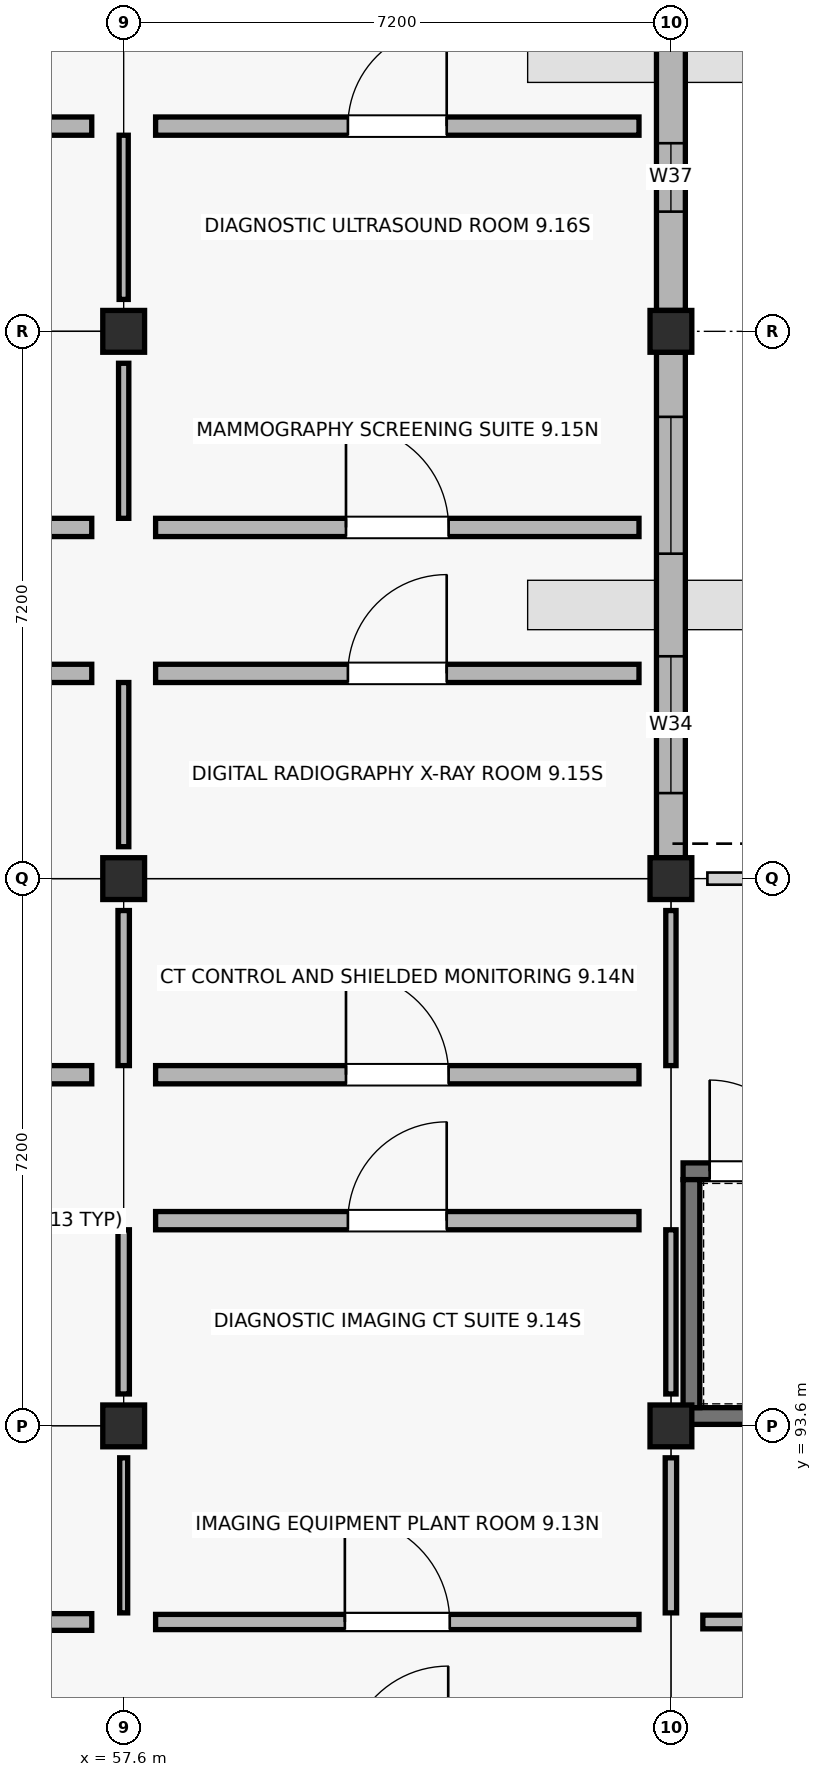
"""IFC4 building model, lengths in metres.
Left out: names, types, materials, properties, quantities, classifications, styles, units other than length and angle.
Written with IfcOpenShell. Run it as: python <this file> out.ifc"""

import sys

from ifc_helpers import new_model, si_unit, direction, frame, frame_2d, origin, origin_2d, place, context, subcontext, project, spatial, rectangle, extrude, element, fill, save


model = new_model("IFC4")
c1 = context("Model", 3, precision=1e-05, world=origin(), true_north=direction((0.0, 1.0)))
c2 = subcontext(c1, "Body", "Model", "MODEL_VIEW")
j1 = project(units=[si_unit("LENGTHUNIT", "METRE"), si_unit("PLANEANGLEUNIT", "RADIAN")], contexts=[c1])
p1 = place(None, origin())
s1 = spatial("IfcSite", under=j1, at=p1, CompositionType="ELEMENT")
p2 = place(p1, origin())
s2 = spatial("IfcBuilding", under=s1, at=p2, CompositionType="ELEMENT")
p3 = place(p2, frame((0.0, 0.0, 4.5)))
s3 = spatial("IfcBuildingStorey", under=s2, at=p3, CompositionType="ELEMENT", Elevation=4.5)
for number, where, z_axis, x_axis in (
    (1, (57.6, 93.6, 0.0), (0.0, 0.0, 1.0), (1.0, 0.0, 0.0)),
    (2, (57.6, 100.8, 0.0), (0.0, 0.0, 1.0), (1.0, 0.0, 0.0)),
    (3, (57.6, 108.0, 0.0), (0.0, 0.0, 1.0), (1.0, 0.0, 0.0)),
    (4, (64.8, 93.6, 0.0), (0.0, 0.0, 1.0), (1.0, 0.0, 0.0)),
    (5, (64.8, 100.8, 0.0), (0.0, 0.0, 1.0), (1.0, 0.0, 0.0)),
    (6, (64.8, 108.0, 0.0), (0.0, 0.0, 1.0), (1.0, 0.0, 0.0)),
):
    element("IfcColumn", number, at=place(p3, frame(where, z_axis=z_axis, x_axis=x_axis)), inside=s3, PredefinedType="COLUMN", context=c2, shape_type="SweptSolid", body=[
        extrude(rectangle(XDim=0.55, YDim=0.55, at=origin_2d()), origin(), (0.0, 0.0, 1.0), 4.5),
    ])
p4 = place(p3, frame((64.8, 101.075, 0.0), z_axis=(0.0, 0.0, 1.0), x_axis=(0.0, 1.0, 0.0)))
e7 = element("IfcWall", 7, at=p4, inside=s3, PredefinedType="SOLIDWALL", context=c2, shape_type="SweptSolid", body=[
    extrude(rectangle(XDim=6.65, YDim=0.38, at=frame_2d((3.325, 0.0))), origin(), (0.0, 0.0, 1.0), 3.52),
])
p5 = place(p4, frame((0.85, 0.0, 0.9)))
e8 = element("IfcOpeningElement", 8, at=p5, cuts=e7, PredefinedType="OPENING", context=c2, shape_type="SweptSolid", body=[
    extrude(rectangle(XDim=1.8, YDim=1.62, at=frame_2d((0.9, 0.81))), frame((0.0, 0.2, 0.0), z_axis=(0.0, -1.0, 0.0), x_axis=(1.0, 0.0, 0.0)), (0.0, 0.0, 1.0), 0.4),
])
p6 = place(p4, frame((4.0, 0.0, 0.9)))
e9 = element("IfcOpeningElement", 9, at=p6, cuts=e7, PredefinedType="OPENING", context=c2, shape_type="SweptSolid", body=[
    extrude(rectangle(XDim=1.8, YDim=1.62, at=frame_2d((0.9, 0.81))), frame((0.0, 0.2, 0.0), z_axis=(0.0, -1.0, 0.0), x_axis=(1.0, 0.0, 0.0)), (0.0, 0.0, 1.0), 0.4),
])
p7 = place(p3, frame((64.8, 108.275, 0.0), z_axis=(0.0, 0.0, 1.0), x_axis=(0.0, 1.0, 0.0)))
e10 = element("IfcWall", 10, at=p7, inside=s3, PredefinedType="SOLIDWALL", context=c2, shape_type="SweptSolid", body=[
    extrude(rectangle(XDim=6.65, YDim=0.38, at=frame_2d((3.325, 0.0))), origin(), (0.0, 0.0, 1.0), 3.52),
])
p8 = place(p7, frame((1.3, 0.0, 0.9)))
e11 = element("IfcOpeningElement", 11, at=p8, cuts=e10, PredefinedType="OPENING", context=c2, shape_type="SweptSolid", body=[
    extrude(rectangle(XDim=0.9, YDim=1.75, at=frame_2d((0.45, 0.875))), frame((0.0, 0.2, 0.0), z_axis=(0.0, -1.0, 0.0), x_axis=(1.0, 0.0, 0.0)), (0.0, 0.0, 1.0), 0.4),
])
p9 = place(p7, frame((4.45, 0.0, 0.9)))
e12 = element("IfcOpeningElement", 12, at=p9, cuts=e10, PredefinedType="OPENING", context=c2, shape_type="SweptSolid", body=[
    extrude(rectangle(XDim=0.9, YDim=1.75, at=frame_2d((0.45, 0.875))), frame((0.0, 0.2, 0.0), z_axis=(0.0, -1.0, 0.0), x_axis=(1.0, 0.0, 0.0)), (0.0, 0.0, 1.0), 0.4),
])
p10 = place(p3, frame((64.96, 93.73, 0.0), z_axis=(0.0, 0.0, 1.0), x_axis=(1.0, 0.0, 0.0)))
e13 = element("IfcWall", 13, at=p10, inside=s3, PredefinedType="SHEAR", context=c2, shape_type="SweptSolid", body=[
    extrude(rectangle(XDim=6.88, YDim=0.22, at=frame_2d((3.44, 0.0))), origin(), (0.0, 0.0, 1.0), 4.22),
])
p11 = place(p3, frame((64.96, 96.95, 0.0), z_axis=(0.0, 0.0, 1.0), x_axis=(1.0, 0.0, 0.0)))
e14 = element("IfcWall", 14, at=p11, inside=s3, PredefinedType="SHEAR", context=c2, shape_type="SweptSolid", body=[
    extrude(rectangle(XDim=6.88, YDim=0.22, at=frame_2d((3.44, 0.0))), origin(), (0.0, 0.0, 1.0), 4.22),
])
p12 = place(p11, frame((0.35, 0.0, 0.0)))
e15 = element("IfcOpeningElement", 15, at=p12, cuts=e14, PredefinedType="OPENING", context=c2, shape_type="SweptSolid", body=[
    extrude(rectangle(XDim=1.2, YDim=2.15, at=frame_2d((0.6, 1.075))), frame((0.0, 0.12, 0.0), z_axis=(0.0, -1.0, 0.0), x_axis=(1.0, 0.0, 0.0)), (0.0, 0.0, 1.0), 0.24),
])
p13 = place(p3, frame((65.07, 93.84, 0.0), z_axis=(0.0, 0.0, 1.0), x_axis=(0.0, 1.0, 0.0)))
e16 = element("IfcWall", 16, at=p13, inside=s3, PredefinedType="SHEAR", context=c2, shape_type="SweptSolid", body=[
    extrude(rectangle(XDim=3.0, YDim=0.22, at=frame_2d((1.5, 0.0))), origin(), (0.0, 0.0, 1.0), 4.22),
])
p14 = place(p3, frame((65.22, 91.02, 0.0), z_axis=(0.0, 0.0, 1.0), x_axis=(1.0, 0.0, 0.0)))
e17 = element("IfcWall", 17, at=p14, inside=s3, PredefinedType="PARTITIONING", context=c2, shape_type="SweptSolid", body=[
    extrude(rectangle(XDim=6.36, YDim=0.18, at=frame_2d((3.18, 0.0))), origin(), (0.0, 0.0, 1.0), 3.36),
])
p15 = place(p14, frame((2.63, 0.0, 0.0)))
e18 = element("IfcOpeningElement", 18, at=p15, cuts=e17, PredefinedType="OPENING", context=c2, shape_type="SweptSolid", body=[
    extrude(rectangle(XDim=1.1, YDim=2.14, at=frame_2d((0.55, 1.07))), frame((0.0, 0.1, 0.0), z_axis=(0.0, -1.0, 0.0), x_axis=(1.0, 0.0, 0.0)), (0.0, 0.0, 1.0), 0.2),
])
p16 = place(p3, frame((50.82, 91.02, 0.0), z_axis=(0.0, 0.0, 1.0), x_axis=(1.0, 0.0, 0.0)))
e19 = element("IfcWall", 19, at=p16, inside=s3, PredefinedType="SOLIDWALL", context=c2, shape_type="SweptSolid", body=[
    extrude(rectangle(XDim=6.36, YDim=0.22, at=frame_2d((3.18, 0.0))), origin(), (0.0, 0.0, 1.0), 3.36),
])
p17 = place(p16, frame((2.65, 0.0, 0.0)))
e20 = element("IfcOpeningElement", 20, at=p17, cuts=e19, PredefinedType="OPENING", context=c2, shape_type="SweptSolid", body=[
    extrude(rectangle(XDim=1.06, YDim=2.04, at=frame_2d((0.53, 1.02))), frame((0.0, 0.12, 0.0), z_axis=(0.0, -1.0, 0.0), x_axis=(1.0, 0.0, 0.0)), (0.0, 0.0, 1.0), 0.24),
])
p18 = place(p3, frame((57.6, 91.14, 0.0), z_axis=(0.0, 0.0, 1.0), x_axis=(0.0, 1.0, 0.0)))
e21 = element("IfcWall", 21, at=p18, inside=s3, PredefinedType="PARTITIONING", context=c2, shape_type="SweptSolid", body=[
    extrude(rectangle(XDim=2.04, YDim=0.105, at=frame_2d((1.02, 0.0))), origin(), (0.0, 0.0, 1.0), 3.36),
])
p19 = place(p3, frame((50.82, 96.3, 0.0), z_axis=(0.0, 0.0, 1.0), x_axis=(1.0, 0.0, 0.0)))
e22 = element("IfcWall", 22, at=p19, inside=s3, PredefinedType="SOLIDWALL", context=c2, shape_type="SweptSolid", body=[
    extrude(rectangle(XDim=6.36, YDim=0.24, at=frame_2d((3.18, 0.0))), origin(), (0.0, 0.0, 1.0), 3.36),
])
p20 = place(p19, frame((2.53, 0.0, 0.0)))
e23 = element("IfcOpeningElement", 23, at=p20, cuts=e22, PredefinedType="OPENING", context=c2, shape_type="SweptSolid", body=[
    extrude(rectangle(XDim=1.3, YDim=2.15, at=frame_2d((0.65, 1.075))), frame((0.0, 0.13, 0.0), z_axis=(0.0, -1.0, 0.0), x_axis=(1.0, 0.0, 0.0)), (0.0, 0.0, 1.0), 0.26),
])
p21 = place(p3, frame((57.6, 94.02, 0.0), z_axis=(0.0, 0.0, 1.0), x_axis=(0.0, 1.0, 0.0)))
e24 = element("IfcWall", 24, at=p21, inside=s3, PredefinedType="PARTITIONING", context=c2, shape_type="SweptSolid", body=[
    extrude(rectangle(XDim=2.16, YDim=0.15, at=frame_2d((1.08, 0.0))), origin(), (0.0, 0.0, 1.0), 3.36),
])
p22 = place(p3, frame((50.82, 98.22, 0.0), z_axis=(0.0, 0.0, 1.0), x_axis=(1.0, 0.0, 0.0)))
e25 = element("IfcWall", 25, at=p22, inside=s3, PredefinedType="SOLIDWALL", context=c2, shape_type="SweptSolid", body=[
    extrude(rectangle(XDim=6.36, YDim=0.24, at=frame_2d((3.18, 0.0))), origin(), (0.0, 0.0, 1.0), 3.36),
])
p23 = place(p22, frame((2.505, 0.0, 0.0)))
e26 = element("IfcOpeningElement", 26, at=p23, cuts=e25, PredefinedType="OPENING", context=c2, shape_type="SweptSolid", body=[
    extrude(rectangle(XDim=1.35, YDim=2.2, at=frame_2d((0.675, 1.1))), frame((0.0, 0.13, 0.0), z_axis=(0.0, -1.0, 0.0), x_axis=(1.0, 0.0, 0.0)), (0.0, 0.0, 1.0), 0.26),
])
p24 = place(p3, frame((57.6, 98.34, 0.0), z_axis=(0.0, 0.0, 1.0), x_axis=(0.0, 1.0, 0.0)))
e27 = element("IfcWall", 27, at=p24, inside=s3, PredefinedType="PARTITIONING", context=c2, shape_type="SweptSolid", body=[
    extrude(rectangle(XDim=2.04, YDim=0.15, at=frame_2d((1.02, 0.0))), origin(), (0.0, 0.0, 1.0), 3.36),
])
p25 = place(p3, frame((50.82, 103.5, 0.0), z_axis=(0.0, 0.0, 1.0), x_axis=(1.0, 0.0, 0.0)))
e28 = element("IfcWall", 28, at=p25, inside=s3, PredefinedType="SOLIDWALL", context=c2, shape_type="SweptSolid", body=[
    extrude(rectangle(XDim=6.36, YDim=0.24, at=frame_2d((3.18, 0.0))), origin(), (0.0, 0.0, 1.0), 3.36),
])
p26 = place(p25, frame((2.53, 0.0, 0.0)))
e29 = element("IfcOpeningElement", 29, at=p26, cuts=e28, PredefinedType="OPENING", context=c2, shape_type="SweptSolid", body=[
    extrude(rectangle(XDim=1.3, YDim=2.15, at=frame_2d((0.65, 1.075))), frame((0.0, 0.13, 0.0), z_axis=(0.0, -1.0, 0.0), x_axis=(1.0, 0.0, 0.0)), (0.0, 0.0, 1.0), 0.26),
])
p27 = place(p3, frame((57.6, 101.22, 0.0), z_axis=(0.0, 0.0, 1.0), x_axis=(0.0, 1.0, 0.0)))
e30 = element("IfcWall", 30, at=p27, inside=s3, PredefinedType="PARTITIONING", context=c2, shape_type="SweptSolid", body=[
    extrude(rectangle(XDim=2.16, YDim=0.135, at=frame_2d((1.08, 0.0))), origin(), (0.0, 0.0, 1.0), 3.36),
])
p28 = place(p3, frame((50.82, 105.42, 0.0), z_axis=(0.0, 0.0, 1.0), x_axis=(1.0, 0.0, 0.0)))
e31 = element("IfcWall", 31, at=p28, inside=s3, PredefinedType="SOLIDWALL", context=c2, shape_type="SweptSolid", body=[
    extrude(rectangle(XDim=6.36, YDim=0.24, at=frame_2d((3.18, 0.0))), origin(), (0.0, 0.0, 1.0), 3.36),
])
p29 = place(p28, frame((2.505, 0.0, 0.0)))
e32 = element("IfcOpeningElement", 32, at=p29, cuts=e31, PredefinedType="OPENING", context=c2, shape_type="SweptSolid", body=[
    extrude(rectangle(XDim=1.35, YDim=2.2, at=frame_2d((0.675, 1.1))), frame((0.0, 0.13, 0.0), z_axis=(0.0, -1.0, 0.0), x_axis=(1.0, 0.0, 0.0)), (0.0, 0.0, 1.0), 0.26),
])
p30 = place(p3, frame((57.6, 105.54, 0.0), z_axis=(0.0, 0.0, 1.0), x_axis=(0.0, 1.0, 0.0)))
e33 = element("IfcWall", 33, at=p30, inside=s3, PredefinedType="PARTITIONING", context=c2, shape_type="SweptSolid", body=[
    extrude(rectangle(XDim=2.04, YDim=0.135, at=frame_2d((1.02, 0.0))), origin(), (0.0, 0.0, 1.0), 3.36),
])
p31 = place(p3, frame((50.82, 110.7, 0.0), z_axis=(0.0, 0.0, 1.0), x_axis=(1.0, 0.0, 0.0)))
e34 = element("IfcWall", 34, at=p31, inside=s3, PredefinedType="SOLIDWALL", context=c2, shape_type="SweptSolid", body=[
    extrude(rectangle(XDim=6.36, YDim=0.24, at=frame_2d((3.18, 0.0))), origin(), (0.0, 0.0, 1.0), 3.36),
])
p32 = place(p31, frame((2.53, 0.0, 0.0)))
e35 = element("IfcOpeningElement", 35, at=p32, cuts=e34, PredefinedType="OPENING", context=c2, shape_type="SweptSolid", body=[
    extrude(rectangle(XDim=1.3, YDim=2.15, at=frame_2d((0.65, 1.075))), frame((0.0, 0.13, 0.0), z_axis=(0.0, -1.0, 0.0), x_axis=(1.0, 0.0, 0.0)), (0.0, 0.0, 1.0), 0.26),
])
p33 = place(p3, frame((57.6, 108.42, 0.0), z_axis=(0.0, 0.0, 1.0), x_axis=(0.0, 1.0, 0.0)))
e36 = element("IfcWall", 36, at=p33, inside=s3, PredefinedType="PARTITIONING", context=c2, shape_type="SweptSolid", body=[
    extrude(rectangle(XDim=2.16, YDim=0.12, at=frame_2d((1.08, 0.0))), origin(), (0.0, 0.0, 1.0), 3.36),
])
p34 = place(p3, frame((58.02, 91.02, 0.0), z_axis=(0.0, 0.0, 1.0), x_axis=(1.0, 0.0, 0.0)))
e37 = element("IfcWall", 37, at=p34, inside=s3, PredefinedType="SOLIDWALL", context=c2, shape_type="SweptSolid", body=[
    extrude(rectangle(XDim=6.36, YDim=0.2, at=frame_2d((3.18, 0.0))), origin(), (0.0, 0.0, 1.0), 3.36),
])
p35 = place(p34, frame((2.49, 0.0, 0.0)))
e38 = element("IfcOpeningElement", 38, at=p35, cuts=e37, PredefinedType="OPENING", context=c2, shape_type="SweptSolid", body=[
    extrude(rectangle(XDim=1.38, YDim=2.04, at=frame_2d((0.69, 1.02))), frame((0.0, 0.11, 0.0), z_axis=(0.0, -1.0, 0.0), x_axis=(1.0, 0.0, 0.0)), (0.0, 0.0, 1.0), 0.22),
])
p36 = place(p3, frame((64.8, 91.14, 0.0), z_axis=(0.0, 0.0, 1.0), x_axis=(0.0, 1.0, 0.0)))
e39 = element("IfcWall", 39, at=p36, inside=s3, PredefinedType="PARTITIONING", context=c2, shape_type="SweptSolid", body=[
    extrude(rectangle(XDim=2.04, YDim=0.15, at=frame_2d((1.02, 0.0))), origin(), (0.0, 0.0, 1.0), 3.36),
])
p37 = place(p3, frame((58.02, 96.3, 0.0), z_axis=(0.0, 0.0, 1.0), x_axis=(1.0, 0.0, 0.0)))
e40 = element("IfcWall", 40, at=p37, inside=s3, PredefinedType="SOLIDWALL", context=c2, shape_type="SweptSolid", body=[
    extrude(rectangle(XDim=6.36, YDim=0.24, at=frame_2d((3.18, 0.0))), origin(), (0.0, 0.0, 1.0), 3.36),
])
p38 = place(p37, frame((2.53, 0.0, 0.0)))
e41 = element("IfcOpeningElement", 41, at=p38, cuts=e40, PredefinedType="OPENING", context=c2, shape_type="SweptSolid", body=[
    extrude(rectangle(XDim=1.3, YDim=2.15, at=frame_2d((0.65, 1.075))), frame((0.0, 0.13, 0.0), z_axis=(0.0, -1.0, 0.0), x_axis=(1.0, 0.0, 0.0)), (0.0, 0.0, 1.0), 0.26),
])
p39 = place(p3, frame((64.8, 94.02, 0.0), z_axis=(0.0, 0.0, 1.0), x_axis=(0.0, 1.0, 0.0)))
e42 = element("IfcWall", 42, at=p39, inside=s3, PredefinedType="PARTITIONING", context=c2, shape_type="SweptSolid", body=[
    extrude(rectangle(XDim=2.16, YDim=0.135, at=frame_2d((1.08, 0.0))), origin(), (0.0, 0.0, 1.0), 3.36),
])
p40 = place(p3, frame((58.02, 98.22, 0.0), z_axis=(0.0, 0.0, 1.0), x_axis=(1.0, 0.0, 0.0)))
e43 = element("IfcWall", 43, at=p40, inside=s3, PredefinedType="SOLIDWALL", context=c2, shape_type="SweptSolid", body=[
    extrude(rectangle(XDim=6.36, YDim=0.24, at=frame_2d((3.18, 0.0))), origin(), (0.0, 0.0, 1.0), 3.36),
])
p41 = place(p40, frame((2.505, 0.0, 0.0)))
e44 = element("IfcOpeningElement", 44, at=p41, cuts=e43, PredefinedType="OPENING", context=c2, shape_type="SweptSolid", body=[
    extrude(rectangle(XDim=1.35, YDim=2.2, at=frame_2d((0.675, 1.1))), frame((0.0, 0.13, 0.0), z_axis=(0.0, -1.0, 0.0), x_axis=(1.0, 0.0, 0.0)), (0.0, 0.0, 1.0), 0.26),
])
p42 = place(p3, frame((64.8, 98.34, 0.0), z_axis=(0.0, 0.0, 1.0), x_axis=(0.0, 1.0, 0.0)))
e45 = element("IfcWall", 45, at=p42, inside=s3, PredefinedType="PARTITIONING", context=c2, shape_type="SweptSolid", body=[
    extrude(rectangle(XDim=2.04, YDim=0.135, at=frame_2d((1.02, 0.0))), origin(), (0.0, 0.0, 1.0), 3.36),
])
p43 = place(p3, frame((58.02, 103.5, 0.0), z_axis=(0.0, 0.0, 1.0), x_axis=(1.0, 0.0, 0.0)))
e46 = element("IfcWall", 46, at=p43, inside=s3, PredefinedType="SOLIDWALL", context=c2, shape_type="SweptSolid", body=[
    extrude(rectangle(XDim=6.36, YDim=0.24, at=frame_2d((3.18, 0.0))), origin(), (0.0, 0.0, 1.0), 3.36),
])
p44 = place(p43, frame((2.53, 0.0, 0.0)))
e47 = element("IfcOpeningElement", 47, at=p44, cuts=e46, PredefinedType="OPENING", context=c2, shape_type="SweptSolid", body=[
    extrude(rectangle(XDim=1.3, YDim=2.15, at=frame_2d((0.65, 1.075))), frame((0.0, 0.13, 0.0), z_axis=(0.0, -1.0, 0.0), x_axis=(1.0, 0.0, 0.0)), (0.0, 0.0, 1.0), 0.26),
])
p45 = place(p3, frame((58.02, 105.42, 0.0), z_axis=(0.0, 0.0, 1.0), x_axis=(1.0, 0.0, 0.0)))
e48 = element("IfcWall", 48, at=p45, inside=s3, PredefinedType="SOLIDWALL", context=c2, shape_type="SweptSolid", body=[
    extrude(rectangle(XDim=6.36, YDim=0.24, at=frame_2d((3.18, 0.0))), origin(), (0.0, 0.0, 1.0), 3.36),
])
p46 = place(p45, frame((2.505, 0.0, 0.0)))
e49 = element("IfcOpeningElement", 49, at=p46, cuts=e48, PredefinedType="OPENING", context=c2, shape_type="SweptSolid", body=[
    extrude(rectangle(XDim=1.35, YDim=2.2, at=frame_2d((0.675, 1.1))), frame((0.0, 0.13, 0.0), z_axis=(0.0, -1.0, 0.0), x_axis=(1.0, 0.0, 0.0)), (0.0, 0.0, 1.0), 0.26),
])
p47 = place(p3, frame((58.02, 110.7, 0.0), z_axis=(0.0, 0.0, 1.0), x_axis=(1.0, 0.0, 0.0)))
e50 = element("IfcWall", 50, at=p47, inside=s3, PredefinedType="SOLIDWALL", context=c2, shape_type="SweptSolid", body=[
    extrude(rectangle(XDim=6.36, YDim=0.24, at=frame_2d((3.18, 0.0))), origin(), (0.0, 0.0, 1.0), 3.36),
])
p48 = place(p47, frame((2.53, 0.0, 0.0)))
e51 = element("IfcOpeningElement", 51, at=p48, cuts=e50, PredefinedType="OPENING", context=c2, shape_type="SweptSolid", body=[
    extrude(rectangle(XDim=1.3, YDim=2.15, at=frame_2d((0.65, 1.075))), frame((0.0, 0.13, 0.0), z_axis=(0.0, -1.0, 0.0), x_axis=(1.0, 0.0, 0.0)), (0.0, 0.0, 1.0), 0.26),
])
p49 = place(p5, origin())
e52 = element("IfcWindow", 52, at=p49, inside=s3, PartitioningType="SINGLE_PANEL", PredefinedType="WINDOW", context=c2, shape_type="SweptSolid", body=[
    extrude(rectangle(XDim=1.8, YDim=1.62, at=frame_2d((0.9, 0.81))), frame((0.0, 0.03, 0.0), z_axis=(0.0, -1.0, 0.0), x_axis=(1.0, 0.0, 0.0)), (0.0, 0.0, 1.0), 0.06),
])
fill(e8, e52)
p50 = place(p6, origin())
e53 = element("IfcWindow", 53, at=p50, inside=s3, PartitioningType="SINGLE_PANEL", PredefinedType="WINDOW", context=c2, shape_type="SweptSolid", body=[
    extrude(rectangle(XDim=1.8, YDim=1.62, at=frame_2d((0.9, 0.81))), frame((0.0, 0.03, 0.0), z_axis=(0.0, -1.0, 0.0), x_axis=(1.0, 0.0, 0.0)), (0.0, 0.0, 1.0), 0.06),
])
fill(e9, e53)
p51 = place(p8, origin())
e54 = element("IfcWindow", 54, at=p51, inside=s3, PartitioningType="SINGLE_PANEL", PredefinedType="WINDOW", context=c2, shape_type="SweptSolid", body=[
    extrude(rectangle(XDim=0.9, YDim=1.75, at=frame_2d((0.45, 0.875))), frame((0.0, 0.03, 0.0), z_axis=(0.0, -1.0, 0.0), x_axis=(1.0, 0.0, 0.0)), (0.0, 0.0, 1.0), 0.06),
])
fill(e11, e54)
p52 = place(p12, origin())
e55 = element("IfcDoor", 55, at=p52, inside=s3, OperationType="SINGLE_SWING_LEFT", PredefinedType="DOOR", context=c2, shape_type="SweptSolid", body=[
    extrude(rectangle(XDim=1.2, YDim=2.15, at=frame_2d((0.6, 1.075))), frame((0.0, 0.025, 0.0), z_axis=(0.0, -1.0, 0.0), x_axis=(1.0, 0.0, 0.0)), (0.0, 0.0, 1.0), 0.05),
])
fill(e15, e55)
p53 = place(p35, origin())
e56 = element("IfcDoor", 56, at=p53, inside=s3, OperationType="SINGLE_SWING_LEFT", PredefinedType="DOOR", context=c2, shape_type="SweptSolid", body=[
    extrude(rectangle(XDim=1.38, YDim=2.04, at=frame_2d((0.69, 1.02))), frame((0.0, 0.025, 0.0), z_axis=(0.0, -1.0, 0.0), x_axis=(1.0, 0.0, 0.0)), (0.0, 0.0, 1.0), 0.05),
])
fill(e38, e56)
p54 = place(p38, origin())
e57 = element("IfcDoor", 57, at=p54, inside=s3, OperationType="SINGLE_SWING_RIGHT", PredefinedType="DOOR", context=c2, shape_type="SweptSolid", body=[
    extrude(rectangle(XDim=1.3, YDim=2.15, at=frame_2d((0.65, 1.075))), frame((0.0, 0.025, 0.0), z_axis=(0.0, -1.0, 0.0), x_axis=(1.0, 0.0, 0.0)), (0.0, 0.0, 1.0), 0.05),
])
fill(e41, e57)
p55 = place(p41, origin())
e58 = element("IfcDoor", 58, at=p55, inside=s3, OperationType="SINGLE_SWING_LEFT", PredefinedType="DOOR", context=c2, shape_type="SweptSolid", body=[
    extrude(rectangle(XDim=1.35, YDim=2.2, at=frame_2d((0.675, 1.1))), frame((0.0, 0.025, 0.0), z_axis=(0.0, -1.0, 0.0), x_axis=(1.0, 0.0, 0.0)), (0.0, 0.0, 1.0), 0.05),
])
fill(e44, e58)
p56 = place(p44, origin())
e59 = element("IfcDoor", 59, at=p56, inside=s3, OperationType="SINGLE_SWING_RIGHT", PredefinedType="DOOR", context=c2, shape_type="SweptSolid", body=[
    extrude(rectangle(XDim=1.3, YDim=2.15, at=frame_2d((0.65, 1.075))), frame((0.0, 0.025, 0.0), z_axis=(0.0, -1.0, 0.0), x_axis=(1.0, 0.0, 0.0)), (0.0, 0.0, 1.0), 0.05),
])
fill(e47, e59)
p57 = place(p46, origin())
e60 = element("IfcDoor", 60, at=p57, inside=s3, OperationType="SINGLE_SWING_LEFT", PredefinedType="DOOR", context=c2, shape_type="SweptSolid", body=[
    extrude(rectangle(XDim=1.35, YDim=2.2, at=frame_2d((0.675, 1.1))), frame((0.0, 0.025, 0.0), z_axis=(0.0, -1.0, 0.0), x_axis=(1.0, 0.0, 0.0)), (0.0, 0.0, 1.0), 0.05),
])
fill(e49, e60)
p58 = place(p48, origin())
e61 = element("IfcDoor", 61, at=p58, inside=s3, OperationType="SINGLE_SWING_RIGHT", PredefinedType="DOOR", context=c2, shape_type="SweptSolid", body=[
    extrude(rectangle(XDim=1.3, YDim=2.15, at=frame_2d((0.65, 1.075))), frame((0.0, 0.025, 0.0), z_axis=(0.0, -1.0, 0.0), x_axis=(1.0, 0.0, 0.0)), (0.0, 0.0, 1.0), 0.05),
])
fill(e51, e61)
save(model, sys.argv[1])
